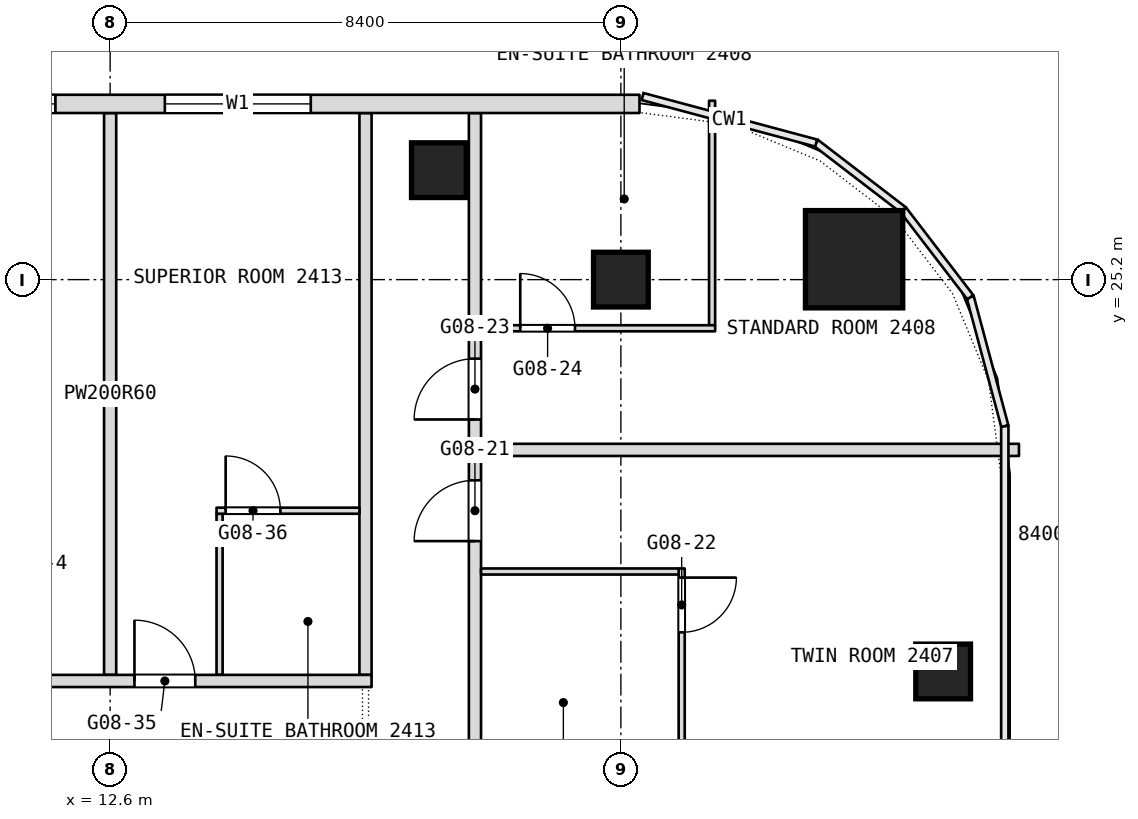
"""IFC4 building model, lengths in metres.
Left out: names, types, materials, properties, quantities, classifications, styles, units other than length and angle.
Written with IfcOpenShell. Run it as: python <this file> out.ifc"""

import sys

from ifc_helpers import new_model, si_unit, direction, frame, frame_2d, origin, origin_2d, place, context, subcontext, project, spatial, rectangle, extrude, element, fill, save


model = new_model("IFC4")
c1 = context("Model", 3, precision=1e-05, world=origin(), true_north=direction((0.0, 1.0)))
c2 = subcontext(c1, "Body", "Model", "MODEL_VIEW")
j1 = project(units=[si_unit("LENGTHUNIT", "METRE"), si_unit("PLANEANGLEUNIT", "RADIAN")], contexts=[c1])
p1 = place(None, origin())
s1 = spatial("IfcSite", under=j1, at=p1, CompositionType="ELEMENT")
p2 = place(p1, origin())
s2 = spatial("IfcBuilding", under=s1, at=p2, CompositionType="ELEMENT")
p3 = place(p2, frame((0.0, 0.0, 112.1)))
s3 = spatial("IfcBuildingStorey", under=s2, at=p3, CompositionType="ELEMENT", Elevation=112.1)
p4 = place(p3, frame((24.835, 25.535, 0.0), z_axis=(0.0, 0.0, 1.0), x_axis=(1.0, 0.0, 0.0)))
e1 = element("IfcColumn", 1, at=p4, inside=s3, PredefinedType="COLUMN", context=c2, shape_type="SweptSolid", body=[
    extrude(rectangle(XDim=1.6, YDim=1.6, at=origin_2d()), origin(), (0.0, 0.0, 1.0), 3.6),
])
for number, where, z_axis, x_axis in (
    (2, (21.0, 25.2, 0.0), (0.0, 0.0, 1.0), (1.0, 0.0, 0.0)),
    (3, (18.007, 27.0, 0.0), (0.0, 0.0, 1.0), (1.0, 0.0, 0.0)),
    (4, (26.3, 18.756, 0.0), (0.0, 0.0, 1.0), (1.0, 0.0, 0.0)),
):
    element("IfcColumn", number, at=place(p3, frame(where, z_axis=z_axis, x_axis=x_axis)), inside=s3, PredefinedType="COLUMN", context=c2, shape_type="SweptSolid", body=[
        extrude(rectangle(XDim=0.9, YDim=0.9, at=origin_2d()), origin(), (0.0, 0.0, 1.0), 3.6),
    ])
p5 = place(p3, frame((22.5, 24.45, 0.0), z_axis=(0.0, 0.0, 1.0), x_axis=(0.0, 1.0, 0.0)))
e5 = element("IfcWall", 5, at=p5, inside=s3, PredefinedType="PARTITIONING", context=c2, shape_type="SweptSolid", body=[
    extrude(rectangle(XDim=3.692, YDim=0.1, at=frame_2d((1.846, 0.0))), origin(), (0.0, 0.0, 1.0), 3.34),
])
p6 = place(p3, frame((22.0, 16.9, 0.0), z_axis=(0.0, 0.0, 1.0), x_axis=(0.0, 1.0, 0.0)))
e6 = element("IfcWall", 6, at=p6, inside=s3, PredefinedType="PARTITIONING", context=c2, shape_type="SweptSolid", body=[
    extrude(rectangle(XDim=3.55, YDim=0.1, at=frame_2d((1.775, 0.0))), origin(), (0.0, 0.0, 1.0), 3.34),
])
p7 = place(p6, frame((2.5, 0.0, 0.0)))
e7 = element("IfcOpeningElement", 7, at=p7, cuts=e6, PredefinedType="OPENING", context=c2, shape_type="SweptSolid", body=[
    extrude(rectangle(XDim=0.9, YDim=2.1, at=frame_2d((0.45, 1.05))), frame((0.0, 0.05, 0.0), z_axis=(0.0, -1.0, 0.0), x_axis=(1.0, 0.0, 0.0)), (0.0, 0.0, 1.0), 0.1),
])
p8 = place(p3, frame((18.6, -21.708, 0.0), z_axis=(0.0, 0.0, 1.0), x_axis=(0.0, 1.0, 0.0)))
e8 = element("IfcWall", 8, at=p8, inside=s3, PredefinedType="PARTITIONING", context=c2, shape_type="SweptSolid", body=[
    extrude(rectangle(XDim=49.648, YDim=0.2, at=frame_2d((24.824, 0.0))), origin(), (0.0, 0.0, 1.0), 3.34),
])
p9 = place(p8, frame((2.204, 0.0, 0.0)))
e9 = element("IfcOpeningElement", 9, at=p9, cuts=e8, PredefinedType="OPENING", context=c2, shape_type="SweptSolid", body=[
    extrude(rectangle(XDim=1.0, YDim=2.1, at=frame_2d((0.5, 1.05))), frame((0.0, 0.1, 0.0), z_axis=(0.0, -1.0, 0.0), x_axis=(1.0, 0.0, 0.0)), (0.0, 0.0, 1.0), 0.2),
])
p10 = place(p8, frame((7.708, 0.0, 0.0)))
e10 = element("IfcOpeningElement", 10, at=p10, cuts=e8, PredefinedType="OPENING", context=c2, shape_type="SweptSolid", body=[
    extrude(rectangle(XDim=1.0, YDim=2.1, at=frame_2d((0.5, 1.05))), frame((0.0, 0.1, 0.0), z_axis=(0.0, -1.0, 0.0), x_axis=(1.0, 0.0, 0.0)), (0.0, 0.0, 1.0), 0.2),
])
p11 = place(p8, frame((9.508, 0.0, 0.0)))
e11 = element("IfcOpeningElement", 11, at=p11, cuts=e8, PredefinedType="OPENING", context=c2, shape_type="SweptSolid", body=[
    extrude(rectangle(XDim=1.0, YDim=2.1, at=frame_2d((0.5, 1.05))), frame((0.0, 0.1, 0.0), z_axis=(0.0, -1.0, 0.0), x_axis=(1.0, 0.0, 0.0)), (0.0, 0.0, 1.0), 0.2),
])
p12 = place(p8, frame((13.708, 0.0, 0.0)))
e12 = element("IfcOpeningElement", 12, at=p12, cuts=e8, PredefinedType="OPENING", context=c2, shape_type="SweptSolid", body=[
    extrude(rectangle(XDim=1.0, YDim=2.1, at=frame_2d((0.5, 1.05))), frame((0.0, 0.1, 0.0), z_axis=(0.0, -1.0, 0.0), x_axis=(1.0, 0.0, 0.0)), (0.0, 0.0, 1.0), 0.2),
])
p13 = place(p8, frame((20.308, 0.0, 0.0)))
e13 = element("IfcOpeningElement", 13, at=p13, cuts=e8, PredefinedType="OPENING", context=c2, shape_type="SweptSolid", body=[
    extrude(rectangle(XDim=1.0, YDim=2.1, at=frame_2d((0.5, 1.05))), frame((0.0, 0.1, 0.0), z_axis=(0.0, -1.0, 0.0), x_axis=(1.0, 0.0, 0.0)), (0.0, 0.0, 1.0), 0.2),
])
p14 = place(p8, frame((25.008, 0.0, 0.0)))
e14 = element("IfcOpeningElement", 14, at=p14, cuts=e8, PredefinedType="OPENING", context=c2, shape_type="SweptSolid", body=[
    extrude(rectangle(XDim=1.8, YDim=2.1, at=frame_2d((0.9, 1.05))), frame((0.0, 0.1, 0.0), z_axis=(0.0, -1.0, 0.0), x_axis=(1.0, 0.0, 0.0)), (0.0, 0.0, 1.0), 0.2),
])
p15 = place(p8, frame((30.508, 0.0, 0.0)))
e15 = element("IfcOpeningElement", 15, at=p15, cuts=e8, PredefinedType="OPENING", context=c2, shape_type="SweptSolid", body=[
    extrude(rectangle(XDim=1.0, YDim=2.1, at=frame_2d((0.5, 1.05))), frame((0.0, 0.1, 0.0), z_axis=(0.0, -1.0, 0.0), x_axis=(1.0, 0.0, 0.0)), (0.0, 0.0, 1.0), 0.2),
])
p16 = place(p8, frame((37.108, 0.0, 0.0)))
e16 = element("IfcOpeningElement", 16, at=p16, cuts=e8, PredefinedType="OPENING", context=c2, shape_type="SweptSolid", body=[
    extrude(rectangle(XDim=1.0, YDim=2.1, at=frame_2d((0.5, 1.05))), frame((0.0, 0.1, 0.0), z_axis=(0.0, -1.0, 0.0), x_axis=(1.0, 0.0, 0.0)), (0.0, 0.0, 1.0), 0.2),
])
p17 = place(p8, frame((42.608, 0.0, 0.0)))
e17 = element("IfcOpeningElement", 17, at=p17, cuts=e8, PredefinedType="OPENING", context=c2, shape_type="SweptSolid", body=[
    extrude(rectangle(XDim=1.0, YDim=2.1, at=frame_2d((0.5, 1.05))), frame((0.0, 0.1, 0.0), z_axis=(0.0, -1.0, 0.0), x_axis=(1.0, 0.0, 0.0)), (0.0, 0.0, 1.0), 0.2),
])
p18 = place(p8, frame((44.608, 0.0, 0.0)))
e18 = element("IfcOpeningElement", 18, at=p18, cuts=e8, PredefinedType="OPENING", context=c2, shape_type="SweptSolid", body=[
    extrude(rectangle(XDim=1.0, YDim=2.1, at=frame_2d((0.5, 1.05))), frame((0.0, 0.1, 0.0), z_axis=(0.0, -1.0, 0.0), x_axis=(1.0, 0.0, 0.0)), (0.0, 0.0, 1.0), 0.2),
])
p19 = place(p3, frame((16.8, 18.7, 0.0), z_axis=(0.0, 0.0, 1.0), x_axis=(0.0, 1.0, 0.0)))
e19 = element("IfcWall", 19, at=p19, inside=s3, PredefinedType="PARTITIONING", context=c2, shape_type="SweptSolid", body=[
    extrude(rectangle(XDim=9.24, YDim=0.2, at=frame_2d((4.62, 0.0))), origin(), (0.0, 0.0, 1.0), 3.34),
])
p20 = place(p3, frame((14.4, 18.7, 0.0), z_axis=(0.0, 0.0, 1.0), x_axis=(0.0, 1.0, 0.0)))
e20 = element("IfcWall", 20, at=p20, inside=s3, PredefinedType="PARTITIONING", context=c2, shape_type="SweptSolid", body=[
    extrude(rectangle(XDim=2.65, YDim=0.1, at=frame_2d((1.325, 0.0))), origin(), (0.0, 0.0, 1.0), 3.34),
])
p21 = place(p3, frame((12.6, 18.7, 0.0), z_axis=(0.0, 0.0, 1.0), x_axis=(0.0, 1.0, 0.0)))
e21 = element("IfcWall", 21, at=p21, inside=s3, PredefinedType="PARTITIONING", context=c2, shape_type="SweptSolid", body=[
    extrude(rectangle(XDim=9.24, YDim=0.2, at=frame_2d((4.62, 0.0))), origin(), (0.0, 0.0, 1.0), 3.34),
])
p22 = place(p3, frame((10.7, 18.6, 0.0), z_axis=(0.0, 0.0, 1.0), x_axis=(1.0, 0.0, 0.0)))
e22 = element("IfcWall", 22, at=p22, inside=s3, PredefinedType="PARTITIONING", context=c2, shape_type="SweptSolid", body=[
    extrude(rectangle(XDim=6.2, YDim=0.2, at=frame_2d((3.1, 0.0))), origin(), (0.0, 0.0, 1.0), 3.34),
])
p23 = place(p22, frame((2.3, 0.0, 0.0)))
e23 = element("IfcOpeningElement", 23, at=p23, cuts=e22, PredefinedType="OPENING", context=c2, shape_type="SweptSolid", body=[
    extrude(rectangle(XDim=1.0, YDim=2.1, at=frame_2d((0.5, 1.05))), frame((0.0, 0.1, 0.0), z_axis=(0.0, -1.0, 0.0), x_axis=(1.0, 0.0, 0.0)), (0.0, 0.0, 1.0), 0.2),
])
p24 = place(p3, frame((18.7, 20.4, 0.0), z_axis=(0.0, 0.0, 1.0), x_axis=(1.0, 0.0, 0.0)))
e24 = element("IfcWall", 24, at=p24, inside=s3, PredefinedType="PARTITIONING", context=c2, shape_type="SweptSolid", body=[
    extrude(rectangle(XDim=3.25, YDim=0.1, at=frame_2d((1.625, 0.0))), origin(), (0.0, 0.0, 1.0), 3.34),
])
p25 = place(p3, frame((14.35, 21.4, 0.0), z_axis=(0.0, 0.0, 1.0), x_axis=(1.0, 0.0, 0.0)))
e25 = element("IfcWall", 25, at=p25, inside=s3, PredefinedType="PARTITIONING", context=c2, shape_type="SweptSolid", body=[
    extrude(rectangle(XDim=2.35, YDim=0.1, at=frame_2d((1.175, 0.0))), origin(), (0.0, 0.0, 1.0), 3.34),
])
p26 = place(p25, frame((0.15, 0.0, 0.0)))
e26 = element("IfcOpeningElement", 26, at=p26, cuts=e25, PredefinedType="OPENING", context=c2, shape_type="SweptSolid", body=[
    extrude(rectangle(XDim=0.9, YDim=2.1, at=frame_2d((0.45, 1.05))), frame((0.0, 0.05, 0.0), z_axis=(0.0, -1.0, 0.0), x_axis=(1.0, 0.0, 0.0)), (0.0, 0.0, 1.0), 0.1),
])
p27 = place(p3, frame((18.7, 22.4, 0.0), z_axis=(0.0, 0.0, 1.0), x_axis=(1.0, 0.0, 0.0)))
e27 = element("IfcWall", 27, at=p27, inside=s3, PredefinedType="PARTITIONING", context=c2, shape_type="SweptSolid", body=[
    extrude(rectangle(XDim=8.847, YDim=0.2, at=frame_2d((4.424, 0.0))), origin(), (0.0, 0.0, 1.0), 3.34),
])
p28 = place(p3, frame((18.7, 24.4, 0.0), z_axis=(0.0, 0.0, 1.0), x_axis=(1.0, 0.0, 0.0)))
e28 = element("IfcWall", 28, at=p28, inside=s3, PredefinedType="PARTITIONING", context=c2, shape_type="SweptSolid", body=[
    extrude(rectangle(XDim=3.85, YDim=0.1, at=frame_2d((1.925, 0.0))), origin(), (0.0, 0.0, 1.0), 3.34),
])
p29 = place(p28, frame((0.645, 0.0, 0.0)))
e29 = element("IfcOpeningElement", 29, at=p29, cuts=e28, PredefinedType="OPENING", context=c2, shape_type="SweptSolid", body=[
    extrude(rectangle(XDim=0.9, YDim=2.1, at=frame_2d((0.45, 1.05))), frame((0.0, 0.05, 0.0), z_axis=(0.0, -1.0, 0.0), x_axis=(1.0, 0.0, 0.0)), (0.0, 0.0, 1.0), 0.1),
])
p30 = place(p3, frame((21.306, 28.09, 0.0), z_axis=(0.0, 0.0, 1.0), x_axis=(-1.0, 0.0, 0.0)))
e30 = element("IfcWall", 30, at=p30, inside=s3, PredefinedType="NOTDEFINED", context=c2, shape_type="SweptSolid", body=[
    extrude(rectangle(XDim=42.612, YDim=0.3, at=frame_2d((21.306, 0.0))), origin(), (0.0, 0.0, 1.0), 3.6),
])
p31 = place(p30, frame((5.406, 0.0, 0.9)))
e31 = element("IfcOpeningElement", 31, at=p31, cuts=e30, PredefinedType="OPENING", context=c2, shape_type="SweptSolid", body=[
    extrude(rectangle(XDim=2.4, YDim=2.1, at=frame_2d((1.2, 1.05))), frame((0.0, 0.15, 0.0), z_axis=(0.0, -1.0, 0.0), x_axis=(1.0, 0.0, 0.0)), (0.0, 0.0, 1.0), 0.3),
])
p32 = place(p30, frame((9.606, 0.0, 0.9)))
e32 = element("IfcOpeningElement", 32, at=p32, cuts=e30, PredefinedType="OPENING", context=c2, shape_type="SweptSolid", body=[
    extrude(rectangle(XDim=2.4, YDim=2.1, at=frame_2d((1.2, 1.05))), frame((0.0, 0.15, 0.0), z_axis=(0.0, -1.0, 0.0), x_axis=(1.0, 0.0, 0.0)), (0.0, 0.0, 1.0), 0.3),
])
p33 = place(p30, frame((13.806, 0.0, 0.9)))
e33 = element("IfcOpeningElement", 33, at=p33, cuts=e30, PredefinedType="OPENING", context=c2, shape_type="SweptSolid", body=[
    extrude(rectangle(XDim=2.4, YDim=2.1, at=frame_2d((1.2, 1.05))), frame((0.0, 0.15, 0.0), z_axis=(0.0, -1.0, 0.0), x_axis=(1.0, 0.0, 0.0)), (0.0, 0.0, 1.0), 0.3),
])
p34 = place(p30, frame((18.006, 0.0, 0.9)))
e34 = element("IfcOpeningElement", 34, at=p34, cuts=e30, PredefinedType="OPENING", context=c2, shape_type="SweptSolid", body=[
    extrude(rectangle(XDim=2.4, YDim=2.1, at=frame_2d((1.2, 1.05))), frame((0.0, 0.15, 0.0), z_axis=(0.0, -1.0, 0.0), x_axis=(1.0, 0.0, 0.0)), (0.0, 0.0, 1.0), 0.3),
])
p35 = place(p30, frame((22.206, 0.0, 0.9)))
e35 = element("IfcOpeningElement", 35, at=p35, cuts=e30, PredefinedType="OPENING", context=c2, shape_type="SweptSolid", body=[
    extrude(rectangle(XDim=2.4, YDim=2.1, at=frame_2d((1.2, 1.05))), frame((0.0, 0.15, 0.0), z_axis=(0.0, -1.0, 0.0), x_axis=(1.0, 0.0, 0.0)), (0.0, 0.0, 1.0), 0.3),
])
p36 = place(p30, frame((26.406, 0.0, 0.9)))
e36 = element("IfcOpeningElement", 36, at=p36, cuts=e30, PredefinedType="OPENING", context=c2, shape_type="SweptSolid", body=[
    extrude(rectangle(XDim=2.4, YDim=2.1, at=frame_2d((1.2, 1.05))), frame((0.0, 0.15, 0.0), z_axis=(0.0, -1.0, 0.0), x_axis=(1.0, 0.0, 0.0)), (0.0, 0.0, 1.0), 0.3),
])
p37 = place(p30, frame((30.606, 0.0, 0.9)))
e37 = element("IfcOpeningElement", 37, at=p37, cuts=e30, PredefinedType="OPENING", context=c2, shape_type="SweptSolid", body=[
    extrude(rectangle(XDim=2.4, YDim=2.1, at=frame_2d((1.2, 1.05))), frame((0.0, 0.15, 0.0), z_axis=(0.0, -1.0, 0.0), x_axis=(1.0, 0.0, 0.0)), (0.0, 0.0, 1.0), 0.3),
])
p38 = place(p30, frame((34.806, 0.0, 0.9)))
e38 = element("IfcOpeningElement", 38, at=p38, cuts=e30, PredefinedType="OPENING", context=c2, shape_type="SweptSolid", body=[
    extrude(rectangle(XDim=2.4, YDim=2.1, at=frame_2d((1.2, 1.05))), frame((0.0, 0.15, 0.0), z_axis=(0.0, -1.0, 0.0), x_axis=(1.0, 0.0, 0.0)), (0.0, 0.0, 1.0), 0.3),
])
p39 = place(p7, origin())
e39 = element("IfcDoor", 39, at=p39, inside=s3, OperationType="SINGLE_SWING_RIGHT", PredefinedType="DOOR", context=c2, shape_type="SweptSolid", body=[
    extrude(rectangle(XDim=0.9, YDim=2.1, at=frame_2d((0.45, 1.05))), frame((0.0, 0.025, 0.0), z_axis=(0.0, -1.0, 0.0), x_axis=(1.0, 0.0, 0.0)), (0.0, 0.0, 1.0), 0.05),
])
fill(e7, e39)
p40 = place(p17, origin())
e40 = element("IfcDoor", 40, at=p40, inside=s3, OperationType="SINGLE_SWING_LEFT", PredefinedType="DOOR", context=c2, shape_type="SweptSolid", body=[
    extrude(rectangle(XDim=1.0, YDim=2.1, at=frame_2d((0.5, 1.05))), frame((0.0, 0.025, 0.0), z_axis=(0.0, -1.0, 0.0), x_axis=(1.0, 0.0, 0.0)), (0.0, 0.0, 1.0), 0.05),
])
fill(e17, e40)
p41 = place(p18, origin())
e41 = element("IfcDoor", 41, at=p41, inside=s3, OperationType="SINGLE_SWING_LEFT", PredefinedType="DOOR", context=c2, shape_type="SweptSolid", body=[
    extrude(rectangle(XDim=1.0, YDim=2.1, at=frame_2d((0.5, 1.05))), frame((0.0, 0.025, 0.0), z_axis=(0.0, -1.0, 0.0), x_axis=(1.0, 0.0, 0.0)), (0.0, 0.0, 1.0), 0.05),
])
fill(e18, e41)
p42 = place(p23, origin())
e42 = element("IfcDoor", 42, at=p42, inside=s3, OperationType="SINGLE_SWING_RIGHT", PredefinedType="DOOR", context=c2, shape_type="SweptSolid", body=[
    extrude(rectangle(XDim=1.0, YDim=2.1, at=frame_2d((0.5, 1.05))), frame((0.0, 0.025, 0.0), z_axis=(0.0, -1.0, 0.0), x_axis=(1.0, 0.0, 0.0)), (0.0, 0.0, 1.0), 0.05),
])
fill(e23, e42)
p43 = place(p26, origin())
e43 = element("IfcDoor", 43, at=p43, inside=s3, OperationType="SINGLE_SWING_RIGHT", PredefinedType="DOOR", context=c2, shape_type="SweptSolid", body=[
    extrude(rectangle(XDim=0.9, YDim=2.1, at=frame_2d((0.45, 1.05))), frame((0.0, 0.025, 0.0), z_axis=(0.0, -1.0, 0.0), x_axis=(1.0, 0.0, 0.0)), (0.0, 0.0, 1.0), 0.05),
])
fill(e26, e43)
p44 = place(p29, origin())
e44 = element("IfcDoor", 44, at=p44, inside=s3, OperationType="SINGLE_SWING_RIGHT", PredefinedType="DOOR", context=c2, shape_type="SweptSolid", body=[
    extrude(rectangle(XDim=0.9, YDim=2.1, at=frame_2d((0.45, 1.05))), frame((0.0, 0.025, 0.0), z_axis=(0.0, -1.0, 0.0), x_axis=(1.0, 0.0, 0.0)), (0.0, 0.0, 1.0), 0.05),
])
fill(e29, e44)
p45 = place(p31, origin())
e45 = element("IfcWindow", 45, at=p45, inside=s3, PartitioningType="SINGLE_PANEL", PredefinedType="WINDOW", context=c2, shape_type="SweptSolid", body=[
    extrude(rectangle(XDim=2.4, YDim=2.1, at=frame_2d((1.2, 1.05))), frame((0.0, 0.03, 0.0), z_axis=(0.0, -1.0, 0.0), x_axis=(1.0, 0.0, 0.0)), (0.0, 0.0, 1.0), 0.06),
])
fill(e31, e45)
p46 = place(p32, origin())
e46 = element("IfcWindow", 46, at=p46, inside=s3, PartitioningType="SINGLE_PANEL", PredefinedType="WINDOW", context=c2, shape_type="SweptSolid", body=[
    extrude(rectangle(XDim=2.4, YDim=2.1, at=frame_2d((1.2, 1.05))), frame((0.0, 0.03, 0.0), z_axis=(0.0, -1.0, 0.0), x_axis=(1.0, 0.0, 0.0)), (0.0, 0.0, 1.0), 0.06),
])
fill(e32, e46)
save(model, sys.argv[1])
